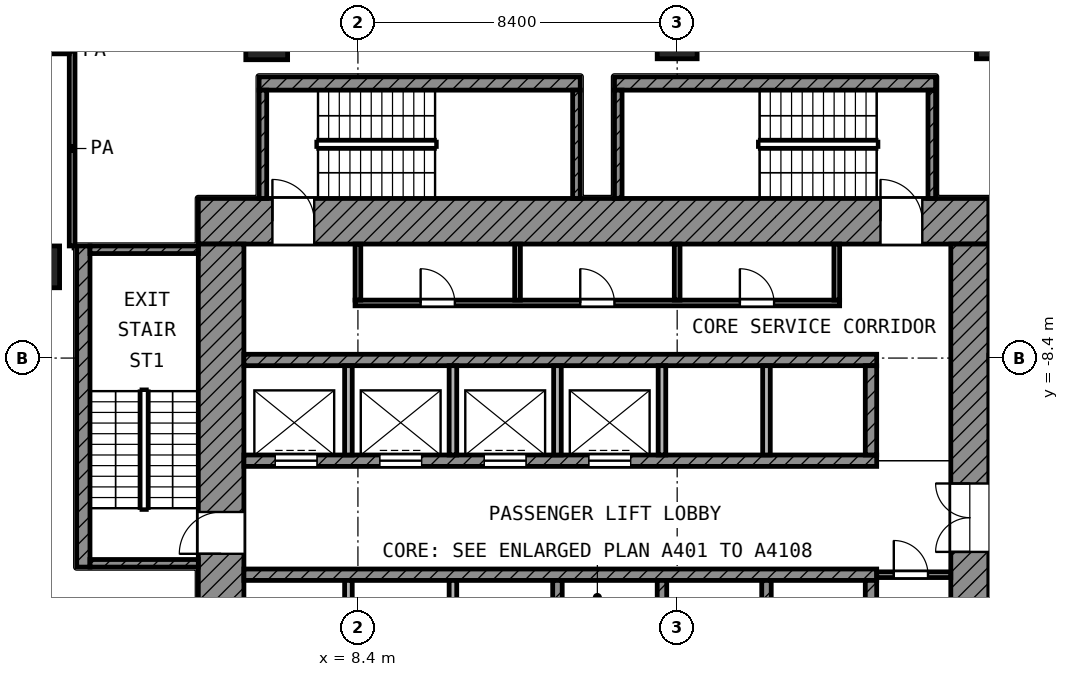
"""IFC4 building model, lengths in metres.
Left out: names, types, materials, properties, quantities, classifications, styles, units other than length and angle.
Written with IfcOpenShell. Run it as: python <this file> out.ifc"""

import sys

from ifc_helpers import new_model, si_unit, direction, frame, frame_2d, origin, origin_2d, place, context, subcontext, project, spatial, rectangle, extrude, element, fill, save


model = new_model("IFC4")
c1 = context("Model", 3, precision=1e-05, world=origin(), true_north=direction((0.0, 1.0)))
c2 = subcontext(c1, "Body", "Model", "MODEL_VIEW")
j1 = project(units=[si_unit("LENGTHUNIT", "METRE"), si_unit("PLANEANGLEUNIT", "RADIAN")], contexts=[c1])
p1 = place(None, origin())
s1 = spatial("IfcSite", under=j1, at=p1, CompositionType="ELEMENT")
p2 = place(p1, origin())
s2 = spatial("IfcBuilding", under=s1, at=p2, CompositionType="ELEMENT")
p3 = place(p2, frame((0.0, 0.0, 145.0)))
s3 = spatial("IfcBuildingStorey", under=s2, at=p3, CompositionType="ELEMENT", Elevation=145.0)
p4 = place(p3, frame((6.0, 0.0, 0.0), z_axis=(0.0, 0.0, 1.0), x_axis=(1.0, 0.0, 0.0)))
e1 = element("IfcColumn", 1, at=p4, inside=s3, PredefinedType="COLUMN", context=c2, shape_type="SweptSolid", body=[
    extrude(rectangle(XDim=1.1, YDim=1.1, at=origin_2d()), origin(), (0.0, 0.0, 1.0), 4.2),
])
for number, where, z_axis, x_axis in (
    (2, (16.8, 0.0, 0.0), (0.0, 0.0, 1.0), (1.0, 0.0, 0.0)),
    (3, (25.2, 0.0, 0.0), (0.0, 0.0, 1.0), (1.0, 0.0, 0.0)),
):
    element("IfcColumn", number, at=place(p3, frame(where, z_axis=z_axis, x_axis=x_axis)), inside=s3, PredefinedType="COLUMN", context=c2, shape_type="SweptSolid", body=[
        extrude(rectangle(XDim=1.05, YDim=1.05, at=origin_2d()), origin(), (0.0, 0.0, 1.0), 4.2),
    ])
p5 = place(p3, frame((0.0, -6.0, 0.0), z_axis=(0.0, 0.0, 1.0), x_axis=(1.0, 0.0, 0.0)))
e4 = element("IfcColumn", 4, at=p5, inside=s3, PredefinedType="COLUMN", context=c2, shape_type="SweptSolid", body=[
    extrude(rectangle(XDim=1.1, YDim=1.1, at=origin_2d()), origin(), (0.0, 0.0, 1.0), 4.2),
])
p6 = place(p3, frame((4.2, -4.8, 0.0), z_axis=(0.0, 0.0, 1.0), x_axis=(1.0, 0.0, 0.0)))
e5 = element("IfcWall", 5, at=p6, inside=s3, PredefinedType="SHEAR", context=c2, shape_type="SweptSolid", body=[
    extrude(rectangle(XDim=20.8, YDim=1.2, at=frame_2d((10.4, 0.0))), origin(), (0.0, 0.0, 1.0), 3.6),
])
p7 = place(p6, frame((1.95, 0.0, 0.0)))
e6 = element("IfcOpeningElement", 6, at=p7, cuts=e5, PredefinedType="OPENING", context=c2, shape_type="SweptSolid", body=[
    extrude(rectangle(XDim=1.1, YDim=2.1, at=frame_2d((0.55, 1.05))), frame((0.0, 0.61, 0.0), z_axis=(0.0, -1.0, 0.0), x_axis=(1.0, 0.0, 0.0)), (0.0, 0.0, 1.0), 1.22),
])
p8 = place(p6, frame((17.95, 0.0, 0.0)))
e7 = element("IfcOpeningElement", 7, at=p8, cuts=e5, PredefinedType="OPENING", context=c2, shape_type="SweptSolid", body=[
    extrude(rectangle(XDim=1.1, YDim=2.1, at=frame_2d((0.55, 1.05))), frame((0.0, 0.61, 0.0), z_axis=(0.0, -1.0, 0.0), x_axis=(1.0, 0.0, 0.0)), (0.0, 0.0, 1.0), 1.22),
])
p9 = place(p3, frame((4.8, -25.0, 0.0), z_axis=(0.0, 0.0, 1.0), x_axis=(0.0, 1.0, 0.0)))
e8 = element("IfcWall", 8, at=p9, inside=s3, PredefinedType="SHEAR", context=c2, shape_type="SweptSolid", body=[
    extrude(rectangle(XDim=19.6, YDim=1.2, at=frame_2d((9.8, 0.0))), origin(), (0.0, 0.0, 1.0), 3.6),
])
p10 = place(p9, frame((11.45, 0.0, 0.0)))
e9 = element("IfcOpeningElement", 9, at=p10, cuts=e8, PredefinedType="OPENING", context=c2, shape_type="SweptSolid", body=[
    extrude(rectangle(XDim=1.1, YDim=2.1, at=frame_2d((0.55, 1.05))), frame((0.0, 0.61, 0.0), z_axis=(0.0, -1.0, 0.0), x_axis=(1.0, 0.0, 0.0)), (0.0, 0.0, 1.0), 1.22),
])
p11 = place(p9, frame((2.15, 0.0, 0.0)))
e10 = element("IfcOpeningElement", 10, at=p11, cuts=e8, PredefinedType="OPENING", context=c2, shape_type="SweptSolid", body=[
    extrude(rectangle(XDim=1.1, YDim=2.1, at=frame_2d((0.55, 1.05))), frame((0.0, 0.61, 0.0), z_axis=(0.0, -1.0, 0.0), x_axis=(1.0, 0.0, 0.0)), (0.0, 0.0, 1.0), 1.22),
])
p12 = place(p3, frame((24.5, -24.0, 0.0), z_axis=(0.0, 0.0, 1.0), x_axis=(0.0, 1.0, 0.0)))
e11 = element("IfcWall", 11, at=p12, inside=s3, PredefinedType="SHEAR", context=c2, shape_type="SweptSolid", body=[
    extrude(rectangle(XDim=18.6, YDim=1.0, at=frame_2d((9.3, 0.0))), origin(), (0.0, 0.0, 1.0), 3.6),
])
p13 = place(p12, frame((10.5, 0.0, 0.0)))
e12 = element("IfcOpeningElement", 12, at=p13, cuts=e11, PredefinedType="OPENING", context=c2, shape_type="SweptSolid", body=[
    extrude(rectangle(XDim=1.8, YDim=2.1, at=frame_2d((0.9, 1.05))), frame((0.0, 0.51, 0.0), z_axis=(0.0, -1.0, 0.0), x_axis=(1.0, 0.0, 0.0)), (0.0, 0.0, 1.0), 1.02),
])
p14 = place(p3, frame((5.4, -8.45, 0.0), z_axis=(0.0, 0.0, 1.0), x_axis=(1.0, 0.0, 0.0)))
e13 = element("IfcWall", 13, at=p14, inside=s3, PredefinedType="SHEAR", context=c2, shape_type="SweptSolid", body=[
    extrude(rectangle(XDim=16.65, YDim=0.3, at=frame_2d((8.325, 0.0))), origin(), (0.0, 0.0, 1.0), 3.6),
])
p15 = place(p3, frame((5.4, -11.1, 0.0), z_axis=(0.0, 0.0, 1.0), x_axis=(1.0, 0.0, 0.0)))
e14 = element("IfcWall", 14, at=p15, inside=s3, PredefinedType="SHEAR", context=c2, shape_type="SweptSolid", body=[
    extrude(rectangle(XDim=16.65, YDim=0.3, at=frame_2d((8.325, 0.0))), origin(), (0.0, 0.0, 1.0), 3.6),
])
p16 = place(p15, frame((0.825, 0.0, 0.0)))
e15 = element("IfcOpeningElement", 15, at=p16, cuts=e14, PredefinedType="OPENING", context=c2, shape_type="SweptSolid", body=[
    extrude(rectangle(XDim=1.1, YDim=2.1, at=frame_2d((0.55, 1.05))), frame((0.0, 0.16, 0.0), z_axis=(0.0, -1.0, 0.0), x_axis=(1.0, 0.0, 0.0)), (0.0, 0.0, 1.0), 0.32),
])
p17 = place(p15, frame((3.575, 0.0, 0.0)))
e16 = element("IfcOpeningElement", 16, at=p17, cuts=e14, PredefinedType="OPENING", context=c2, shape_type="SweptSolid", body=[
    extrude(rectangle(XDim=1.1, YDim=2.1, at=frame_2d((0.55, 1.05))), frame((0.0, 0.16, 0.0), z_axis=(0.0, -1.0, 0.0), x_axis=(1.0, 0.0, 0.0)), (0.0, 0.0, 1.0), 0.32),
])
p18 = place(p15, frame((6.325, 0.0, 0.0)))
e17 = element("IfcOpeningElement", 17, at=p18, cuts=e14, PredefinedType="OPENING", context=c2, shape_type="SweptSolid", body=[
    extrude(rectangle(XDim=1.1, YDim=2.1, at=frame_2d((0.55, 1.05))), frame((0.0, 0.16, 0.0), z_axis=(0.0, -1.0, 0.0), x_axis=(1.0, 0.0, 0.0)), (0.0, 0.0, 1.0), 0.32),
])
p19 = place(p15, frame((9.075, 0.0, 0.0)))
e18 = element("IfcOpeningElement", 18, at=p19, cuts=e14, PredefinedType="OPENING", context=c2, shape_type="SweptSolid", body=[
    extrude(rectangle(XDim=1.1, YDim=2.1, at=frame_2d((0.55, 1.05))), frame((0.0, 0.16, 0.0), z_axis=(0.0, -1.0, 0.0), x_axis=(1.0, 0.0, 0.0)), (0.0, 0.0, 1.0), 0.32),
])
p20 = place(p3, frame((5.4, -14.1, 0.0), z_axis=(0.0, 0.0, 1.0), x_axis=(1.0, 0.0, 0.0)))
e19 = element("IfcWall", 19, at=p20, inside=s3, PredefinedType="SHEAR", context=c2, shape_type="SweptSolid", body=[
    extrude(rectangle(XDim=16.65, YDim=0.3, at=frame_2d((8.325, 0.0))), origin(), (0.0, 0.0, 1.0), 3.6),
])
p21 = place(p3, frame((21.9, -10.95, 0.0), z_axis=(0.0, 0.0, 1.0), x_axis=(0.0, 1.0, 0.0)))
e20 = element("IfcWall", 20, at=p21, inside=s3, PredefinedType="SHEAR", context=c2, shape_type="SweptSolid", body=[
    extrude(rectangle(XDim=2.35, YDim=0.3, at=frame_2d((1.175, 0.0))), origin(), (0.0, 0.0, 1.0), 3.6),
])
p22 = place(p3, frame((21.9, -16.6, 0.0), z_axis=(0.0, 0.0, 1.0), x_axis=(0.0, 1.0, 0.0)))
e21 = element("IfcWall", 21, at=p22, inside=s3, PredefinedType="SHEAR", context=c2, shape_type="SweptSolid", body=[
    extrude(rectangle(XDim=2.35, YDim=0.3, at=frame_2d((1.175, 0.0))), origin(), (0.0, 0.0, 1.0), 3.6),
])
for number, where, z_axis, x_axis in (
    (22, (8.15, -10.95, 0.0), (0.0, 0.0, 1.0), (0.0, 1.0, 0.0)),
    (23, (10.9, -10.95, 0.0), (0.0, 0.0, 1.0), (0.0, 1.0, 0.0)),
    (24, (13.65, -10.95, 0.0), (0.0, 0.0, 1.0), (0.0, 1.0, 0.0)),
    (25, (16.4, -10.95, 0.0), (0.0, 0.0, 1.0), (0.0, 1.0, 0.0)),
    (26, (19.15, -10.95, 0.0), (0.0, 0.0, 1.0), (0.0, 1.0, 0.0)),
):
    element("IfcWall", number, at=place(p3, frame(where, z_axis=z_axis, x_axis=x_axis)), inside=s3, PredefinedType="PARTITIONING", context=c2, shape_type="SweptSolid", body=[
        extrude(rectangle(XDim=2.35, YDim=0.2, at=frame_2d((1.175, 0.0))), origin(), (0.0, 0.0, 1.0), 3.6),
    ])
for number, where, z_axis, x_axis in (
    (27, (8.15, -16.6, 0.0), (0.0, 0.0, 1.0), (0.0, 1.0, 0.0)),
    (28, (10.9, -16.6, 0.0), (0.0, 0.0, 1.0), (0.0, 1.0, 0.0)),
):
    element("IfcWall", number, at=place(p3, frame(where, z_axis=z_axis, x_axis=x_axis)), inside=s3, PredefinedType="PARTITIONING", context=c2, shape_type="SweptSolid", body=[
        extrude(rectangle(XDim=2.35, YDim=0.2, at=frame_2d((1.175, 0.0))), origin(), (0.0, 0.0, 1.0), 3.6),
    ])
for number, where, z_axis, x_axis in (
    (29, (13.65, -16.6, 0.0), (0.0, 0.0, 1.0), (0.0, 1.0, 0.0)),
    (30, (16.4, -16.6, 0.0), (0.0, 0.0, 1.0), (0.0, 1.0, 0.0)),
    (31, (19.15, -16.6, 0.0), (0.0, 0.0, 1.0), (0.0, 1.0, 0.0)),
):
    element("IfcWall", number, at=place(p3, frame(where, z_axis=z_axis, x_axis=x_axis)), inside=s3, PredefinedType="SHEAR", context=c2, shape_type="SweptSolid", body=[
        extrude(rectangle(XDim=2.35, YDim=0.25, at=frame_2d((1.175, 0.0))), origin(), (0.0, 0.0, 1.0), 3.6),
    ])
p23 = place(p3, frame((22.05, -14.1, 0.0), z_axis=(0.0, 0.0, 1.0), x_axis=(1.0, 0.0, 0.0)))
e32 = element("IfcWall", 32, at=p23, inside=s3, PredefinedType="PARTITIONING", context=c2, shape_type="SweptSolid", body=[
    extrude(rectangle(XDim=1.95, YDim=0.15, at=frame_2d((0.975, 0.0))), origin(), (0.0, 0.0, 1.0), 3.6),
])
p24 = place(p23, frame((0.45, 0.0, 0.0)))
e33 = element("IfcOpeningElement", 33, at=p24, cuts=e32, PredefinedType="OPENING", context=c2, shape_type="SweptSolid", body=[
    extrude(rectangle(XDim=0.9, YDim=2.1, at=frame_2d((0.45, 1.05))), frame((0.0, 0.085, 0.0), z_axis=(0.0, -1.0, 0.0), x_axis=(1.0, 0.0, 0.0)), (0.0, 0.0, 1.0), 0.17),
])
p25 = place(p3, frame((8.325, -6.95, 0.0), z_axis=(0.0, 0.0, 1.0), x_axis=(1.0, 0.0, 0.0)))
e34 = element("IfcWall", 34, at=p25, inside=s3, PredefinedType="PARTITIONING", context=c2, shape_type="SweptSolid", body=[
    extrude(rectangle(XDim=12.75, YDim=0.15, at=frame_2d((6.375, 0.0))), origin(), (0.0, 0.0, 1.0), 3.6),
])
p26 = place(p25, frame((1.725, 0.0, 0.0)))
e35 = element("IfcOpeningElement", 35, at=p26, cuts=e34, PredefinedType="OPENING", context=c2, shape_type="SweptSolid", body=[
    extrude(rectangle(XDim=0.9, YDim=2.1, at=frame_2d((0.45, 1.05))), frame((0.0, 0.085, 0.0), z_axis=(0.0, -1.0, 0.0), x_axis=(1.0, 0.0, 0.0)), (0.0, 0.0, 1.0), 0.17),
])
p27 = place(p25, frame((5.925, 0.0, 0.0)))
e36 = element("IfcOpeningElement", 36, at=p27, cuts=e34, PredefinedType="OPENING", context=c2, shape_type="SweptSolid", body=[
    extrude(rectangle(XDim=0.9, YDim=2.1, at=frame_2d((0.45, 1.05))), frame((0.0, 0.085, 0.0), z_axis=(0.0, -1.0, 0.0), x_axis=(1.0, 0.0, 0.0)), (0.0, 0.0, 1.0), 0.17),
])
p28 = place(p25, frame((10.125, 0.0, 0.0)))
e37 = element("IfcOpeningElement", 37, at=p28, cuts=e34, PredefinedType="OPENING", context=c2, shape_type="SweptSolid", body=[
    extrude(rectangle(XDim=0.9, YDim=2.1, at=frame_2d((0.45, 1.05))), frame((0.0, 0.085, 0.0), z_axis=(0.0, -1.0, 0.0), x_axis=(1.0, 0.0, 0.0)), (0.0, 0.0, 1.0), 0.17),
])
for number, where, z_axis, x_axis in (
    (38, (8.4, -6.875, 0.0), (0.0, 0.0, 1.0), (0.0, 1.0, 0.0)),
    (39, (12.6, -6.875, 0.0), (0.0, 0.0, 1.0), (0.0, 1.0, 0.0)),
    (40, (16.8, -6.875, 0.0), (0.0, 0.0, 1.0), (0.0, 1.0, 0.0)),
    (41, (21.0, -6.875, 0.0), (0.0, 0.0, 1.0), (0.0, 1.0, 0.0)),
):
    element("IfcWall", number, at=place(p3, frame(where, z_axis=z_axis, x_axis=x_axis)), inside=s3, PredefinedType="PARTITIONING", context=c2, shape_type="SweptSolid", body=[
        extrude(rectangle(XDim=1.475, YDim=0.15, at=frame_2d((0.738, 0.0))), origin(), (0.0, 0.0, 1.0), 3.6),
    ])
p29 = place(p3, frame((1.175, -13.9, 0.0), z_axis=(0.0, 0.0, 1.0), x_axis=(0.0, 1.0, 0.0)))
e42 = element("IfcWall", 42, at=p29, inside=s3, PredefinedType="SHEAR", context=c2, shape_type="SweptSolid", body=[
    extrude(rectangle(XDim=8.45, YDim=0.35, at=frame_2d((4.225, 0.0))), origin(), (0.0, 0.0, 1.0), 3.6),
])
for number, where, z_axis, x_axis in (
    (43, (1.35, -5.55, 0.0), (0.0, 0.0, 1.0), (1.0, 0.0, 0.0)),
    (44, (1.35, -13.8, 0.0), (0.0, 0.0, 1.0), (1.0, 0.0, 0.0)),
):
    element("IfcWall", number, at=place(p3, frame(where, z_axis=z_axis, x_axis=x_axis)), inside=s3, PredefinedType="SHEAR", context=c2, shape_type="SweptSolid", body=[
        extrude(rectangle(XDim=2.85, YDim=0.2, at=frame_2d((1.425, 0.0))), origin(), (0.0, 0.0, 1.0), 3.6),
    ])
p30 = place(p3, frame((5.8, -1.175, 0.0), z_axis=(0.0, 0.0, 1.0), x_axis=(1.0, 0.0, 0.0)))
e45 = element("IfcWall", 45, at=p30, inside=s3, PredefinedType="SHEAR", context=c2, shape_type="SweptSolid", body=[
    extrude(rectangle(XDim=8.45, YDim=0.35, at=frame_2d((4.225, 0.0))), origin(), (0.0, 0.0, 1.0), 3.6),
])
for number, where, z_axis, x_axis in (
    (46, (5.9, -4.2, 0.0), (0.0, 0.0, 1.0), (0.0, 1.0, 0.0)),
    (47, (14.15, -4.2, 0.0), (0.0, 0.0, 1.0), (0.0, 1.0, 0.0)),
):
    element("IfcWall", number, at=place(p3, frame(where, z_axis=z_axis, x_axis=x_axis)), inside=s3, PredefinedType="SHEAR", context=c2, shape_type="SweptSolid", body=[
        extrude(rectangle(XDim=2.85, YDim=0.2, at=frame_2d((1.425, 0.0))), origin(), (0.0, 0.0, 1.0), 3.6),
    ])
p31 = place(p3, frame((15.15, -1.175, 0.0), z_axis=(0.0, 0.0, 1.0), x_axis=(1.0, 0.0, 0.0)))
e48 = element("IfcWall", 48, at=p31, inside=s3, PredefinedType="SHEAR", context=c2, shape_type="SweptSolid", body=[
    extrude(rectangle(XDim=8.45, YDim=0.35, at=frame_2d((4.225, 0.0))), origin(), (0.0, 0.0, 1.0), 3.6),
])
for number, where, z_axis, x_axis in (
    (49, (15.25, -4.2, 0.0), (0.0, 0.0, 1.0), (0.0, 1.0, 0.0)),
    (50, (23.5, -4.2, 0.0), (0.0, 0.0, 1.0), (0.0, 1.0, 0.0)),
):
    element("IfcWall", number, at=place(p3, frame(where, z_axis=z_axis, x_axis=x_axis)), inside=s3, PredefinedType="SHEAR", context=c2, shape_type="SweptSolid", body=[
        extrude(rectangle(XDim=2.85, YDim=0.2, at=frame_2d((1.425, 0.0))), origin(), (0.0, 0.0, 1.0), 3.6),
    ])
p32 = place(p3, frame((0.08, -0.32, 0.0), z_axis=(0.0, 0.0, 1.0), x_axis=(1.0, 0.0, 0.0)))
e51 = element("IfcWall", 51, at=p32, inside=s3, PredefinedType="PARTITIONING", context=c2, shape_type="SweptSolid", body=[
    extrude(rectangle(XDim=0.723, YDim=0.15, at=frame_2d((0.361, 0.0))), origin(), (0.0, 0.0, 1.0), 3.6),
])
p33 = place(p3, frame((0.88, -5.45, 0.0), z_axis=(0.0, 0.0, 1.0), x_axis=(0.0, 1.0, 0.0)))
e52 = element("IfcWall", 52, at=p33, inside=s3, PredefinedType="PARTITIONING", context=c2, shape_type="SweptSolid", body=[
    extrude(rectangle(XDim=5.128, YDim=0.15, at=frame_2d((2.564, 0.0))), origin(), (0.0, 0.0, 1.0), 3.6),
])
p34 = place(p16, origin())
e53 = element("IfcDoor", 53, at=p34, inside=s3, OperationType="DOUBLE_DOOR_SLIDING", PredefinedType="DOOR", context=c2, shape_type="SweptSolid", body=[
    extrude(rectangle(XDim=1.1, YDim=2.1, at=frame_2d((0.55, 1.05))), frame((0.0, 0.025, 0.0), z_axis=(0.0, -1.0, 0.0), x_axis=(1.0, 0.0, 0.0)), (0.0, 0.0, 1.0), 0.05),
])
fill(e15, e53)
p35 = place(p17, origin())
e54 = element("IfcDoor", 54, at=p35, inside=s3, OperationType="DOUBLE_DOOR_SLIDING", PredefinedType="DOOR", context=c2, shape_type="SweptSolid", body=[
    extrude(rectangle(XDim=1.1, YDim=2.1, at=frame_2d((0.55, 1.05))), frame((0.0, 0.025, 0.0), z_axis=(0.0, -1.0, 0.0), x_axis=(1.0, 0.0, 0.0)), (0.0, 0.0, 1.0), 0.05),
])
fill(e16, e54)
p36 = place(p18, origin())
e55 = element("IfcDoor", 55, at=p36, inside=s3, OperationType="DOUBLE_DOOR_SLIDING", PredefinedType="DOOR", context=c2, shape_type="SweptSolid", body=[
    extrude(rectangle(XDim=1.1, YDim=2.1, at=frame_2d((0.55, 1.05))), frame((0.0, 0.025, 0.0), z_axis=(0.0, -1.0, 0.0), x_axis=(1.0, 0.0, 0.0)), (0.0, 0.0, 1.0), 0.05),
])
fill(e17, e55)
p37 = place(p19, origin())
e56 = element("IfcDoor", 56, at=p37, inside=s3, OperationType="DOUBLE_DOOR_SLIDING", PredefinedType="DOOR", context=c2, shape_type="SweptSolid", body=[
    extrude(rectangle(XDim=1.1, YDim=2.1, at=frame_2d((0.55, 1.05))), frame((0.0, 0.025, 0.0), z_axis=(0.0, -1.0, 0.0), x_axis=(1.0, 0.0, 0.0)), (0.0, 0.0, 1.0), 0.05),
])
fill(e18, e56)
p38 = place(p10, origin())
e57 = element("IfcDoor", 57, at=p38, inside=s3, OperationType="SINGLE_SWING_LEFT", PredefinedType="DOOR", context=c2, shape_type="SweptSolid", body=[
    extrude(rectangle(XDim=1.1, YDim=2.1, at=frame_2d((0.55, 1.05))), frame((0.0, 0.025, 0.0), z_axis=(0.0, -1.0, 0.0), x_axis=(1.0, 0.0, 0.0)), (0.0, 0.0, 1.0), 0.05),
])
fill(e9, e57)
p39 = place(p7, origin())
e58 = element("IfcDoor", 58, at=p39, inside=s3, OperationType="SINGLE_SWING_LEFT", PredefinedType="DOOR", context=c2, shape_type="SweptSolid", body=[
    extrude(rectangle(XDim=1.1, YDim=2.1, at=frame_2d((0.55, 1.05))), frame((0.0, 0.025, 0.0), z_axis=(0.0, -1.0, 0.0), x_axis=(1.0, 0.0, 0.0)), (0.0, 0.0, 1.0), 0.05),
])
fill(e6, e58)
p40 = place(p8, origin())
e59 = element("IfcDoor", 59, at=p40, inside=s3, OperationType="SINGLE_SWING_LEFT", PredefinedType="DOOR", context=c2, shape_type="SweptSolid", body=[
    extrude(rectangle(XDim=1.1, YDim=2.1, at=frame_2d((0.55, 1.05))), frame((0.0, 0.025, 0.0), z_axis=(0.0, -1.0, 0.0), x_axis=(1.0, 0.0, 0.0)), (0.0, 0.0, 1.0), 0.05),
])
fill(e7, e59)
p41 = place(p13, origin())
e60 = element("IfcDoor", 60, at=p41, inside=s3, OperationType="DOUBLE_DOOR_SINGLE_SWING", PredefinedType="DOOR", context=c2, shape_type="SweptSolid", body=[
    extrude(rectangle(XDim=1.8, YDim=2.1, at=frame_2d((0.9, 1.05))), frame((0.0, 0.025, 0.0), z_axis=(0.0, -1.0, 0.0), x_axis=(1.0, 0.0, 0.0)), (0.0, 0.0, 1.0), 0.05),
])
fill(e12, e60)
p42 = place(p26, origin())
e61 = element("IfcDoor", 61, at=p42, inside=s3, OperationType="SINGLE_SWING_LEFT", PredefinedType="DOOR", context=c2, shape_type="SweptSolid", body=[
    extrude(rectangle(XDim=0.9, YDim=2.1, at=frame_2d((0.45, 1.05))), frame((0.0, 0.025, 0.0), z_axis=(0.0, -1.0, 0.0), x_axis=(1.0, 0.0, 0.0)), (0.0, 0.0, 1.0), 0.05),
])
fill(e35, e61)
p43 = place(p27, origin())
e62 = element("IfcDoor", 62, at=p43, inside=s3, OperationType="SINGLE_SWING_LEFT", PredefinedType="DOOR", context=c2, shape_type="SweptSolid", body=[
    extrude(rectangle(XDim=0.9, YDim=2.1, at=frame_2d((0.45, 1.05))), frame((0.0, 0.025, 0.0), z_axis=(0.0, -1.0, 0.0), x_axis=(1.0, 0.0, 0.0)), (0.0, 0.0, 1.0), 0.05),
])
fill(e36, e62)
p44 = place(p28, origin())
e63 = element("IfcDoor", 63, at=p44, inside=s3, OperationType="SINGLE_SWING_LEFT", PredefinedType="DOOR", context=c2, shape_type="SweptSolid", body=[
    extrude(rectangle(XDim=0.9, YDim=2.1, at=frame_2d((0.45, 1.05))), frame((0.0, 0.025, 0.0), z_axis=(0.0, -1.0, 0.0), x_axis=(1.0, 0.0, 0.0)), (0.0, 0.0, 1.0), 0.05),
])
fill(e37, e63)
p45 = place(p24, origin())
e64 = element("IfcDoor", 64, at=p45, inside=s3, OperationType="SINGLE_SWING_LEFT", PredefinedType="DOOR", context=c2, shape_type="SweptSolid", body=[
    extrude(rectangle(XDim=0.9, YDim=2.1, at=frame_2d((0.45, 1.05))), frame((0.0, 0.025, 0.0), z_axis=(0.0, -1.0, 0.0), x_axis=(1.0, 0.0, 0.0)), (0.0, 0.0, 1.0), 0.05),
])
fill(e33, e64)
save(model, sys.argv[1])
